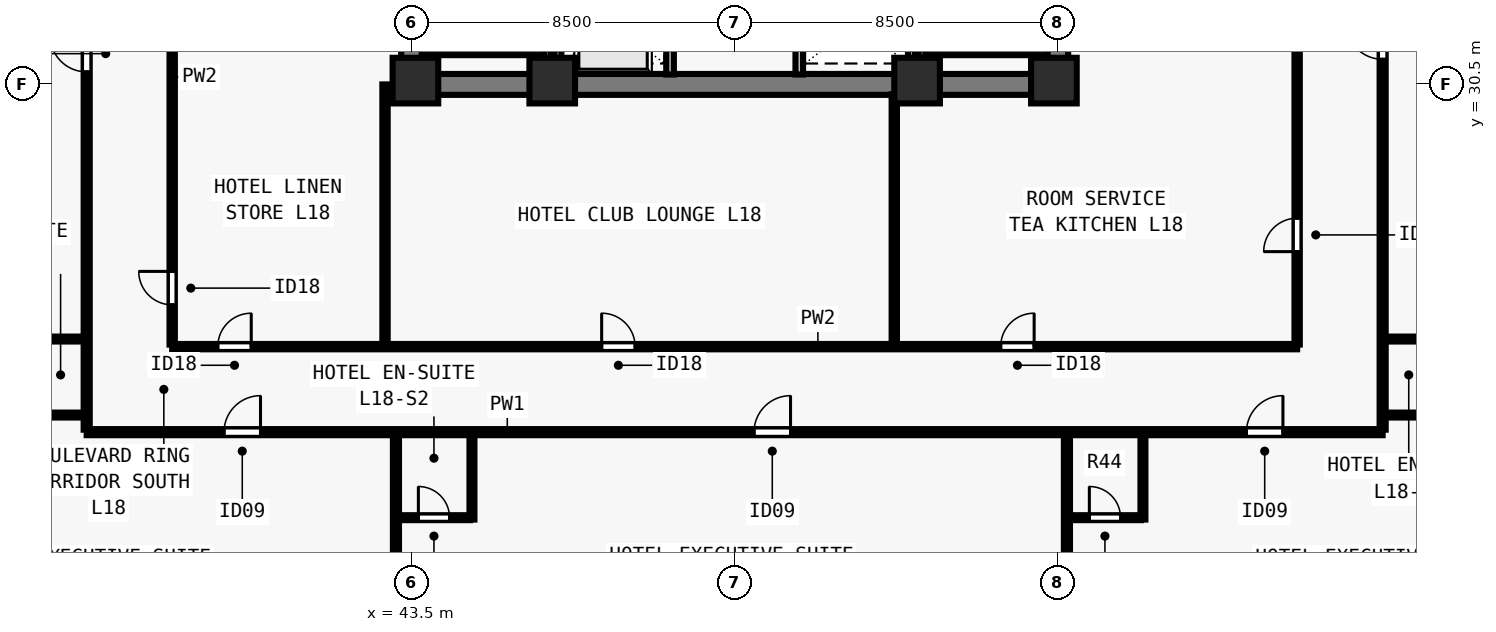
"""IFC4 building model, lengths in metres.
Left out: names, types, materials, properties, quantities, classifications, styles, units other than length and angle.
Written with IfcOpenShell. Run it as: python <this file> out.ifc"""

import sys

from ifc_helpers import new_model, si_unit, direction, frame, frame_2d, origin, origin_2d, place, context, subcontext, project, spatial, rectangle, extrude, element, fill, save


model = new_model("IFC4")
c1 = context("Model", 3, precision=1e-05, world=origin(), true_north=direction((0.0, 1.0)))
c2 = subcontext(c1, "Body", "Model", "MODEL_VIEW")
j1 = project(units=[si_unit("LENGTHUNIT", "METRE"), si_unit("PLANEANGLEUNIT", "RADIAN")], contexts=[c1])
p1 = place(None, origin())
s1 = spatial("IfcSite", under=j1, at=p1, CompositionType="ELEMENT")
p2 = place(p1, origin())
s2 = spatial("IfcBuilding", under=s1, at=p2, CompositionType="ELEMENT")
p3 = place(p2, frame((0.0, 0.0, 69.0)))
s3 = spatial("IfcBuildingStorey", under=s2, at=p3, CompositionType="ELEMENT", Elevation=69.0)
for number, where, z_axis, x_axis in (
    (1, (43.6, 30.6, 0.0), (0.0, 0.0, 1.0), (1.0, 0.0, 0.0)),
    (2, (47.2, 30.6, 0.0), (0.0, 0.0, 1.0), (1.0, 0.0, 0.0)),
    (3, (56.8, 30.6, 0.0), (0.0, 0.0, 1.0), (1.0, 0.0, 0.0)),
    (4, (60.4, 30.6, 0.0), (0.0, 0.0, 1.0), (1.0, 0.0, 0.0)),
):
    element("IfcColumn", number, at=place(p3, frame(where, z_axis=z_axis, x_axis=x_axis)), inside=s3, PredefinedType="COLUMN", context=c2, shape_type="SweptSolid", body=[
        extrude(rectangle(XDim=1.2, YDim=1.2, at=origin_2d()), origin(), (0.0, 0.0, 1.0), 3.5),
    ])
p4 = place(p3, frame((43.225, 30.5, 0.0), z_axis=(0.0, 0.0, 1.0), x_axis=(1.0, 0.0, 0.0)))
e5 = element("IfcWall", 5, at=p4, inside=s3, PredefinedType="SHEAR", context=c2, shape_type="SweptSolid", body=[
    extrude(rectangle(XDim=17.55, YDim=0.55, at=frame_2d((8.775, 0.0))), origin(), (0.0, 0.0, 1.0), 3.28),
])
for number, where, z_axis, x_axis in (
    (6, (43.5, 30.765, 0.0), (0.0, 0.0, 1.0), (0.0, 1.0, 0.0)),
    (7, (60.5, 30.765, 0.0), (0.0, 0.0, 1.0), (0.0, 1.0, 0.0)),
):
    element("IfcWall", number, at=place(p3, frame(where, z_axis=z_axis, x_axis=x_axis)), inside=s3, PredefinedType="SHEAR", context=c2, shape_type="SweptSolid", body=[
        extrude(rectangle(XDim=7.985, YDim=0.55, at=frame_2d((3.993, 0.0))), origin(), (0.0, 0.0, 1.0), 3.28),
    ])
p5 = place(p3, frame((50.3, 30.76, 0.0), z_axis=(0.0, 0.0, 1.0), x_axis=(0.0, 1.0, 0.0)))
e8 = element("IfcWall", 8, at=p5, inside=s3, PredefinedType="SOLIDWALL", context=c2, shape_type="SweptSolid", body=[
    extrude(rectangle(XDim=7.855, YDim=0.2, at=frame_2d((3.927, 0.0))), origin(), (0.0, 0.0, 1.0), 3.28),
])
p6 = place(p5, frame((0.79, 0.0, 0.0)))
e9 = element("IfcOpeningElement", 9, at=p6, cuts=e8, PredefinedType="OPENING", context=c2, shape_type="SweptSolid", body=[
    extrude(rectangle(XDim=1.1, YDim=2.2, at=frame_2d((0.55, 1.1))), frame((0.0, 0.11, 0.0), z_axis=(0.0, -1.0, 0.0), x_axis=(1.0, 0.0, 0.0)), (0.0, 0.0, 1.0), 0.22),
])
p7 = place(p5, frame((3.49, 0.0, 0.0)))
e10 = element("IfcOpeningElement", 10, at=p7, cuts=e8, PredefinedType="OPENING", context=c2, shape_type="SweptSolid", body=[
    extrude(rectangle(XDim=1.1, YDim=2.2, at=frame_2d((0.55, 1.1))), frame((0.0, 0.11, 0.0), z_axis=(0.0, -1.0, 0.0), x_axis=(1.0, 0.0, 0.0)), (0.0, 0.0, 1.0), 0.22),
])
p8 = place(p5, frame((6.19, 0.0, 0.0)))
e11 = element("IfcOpeningElement", 11, at=p8, cuts=e8, PredefinedType="OPENING", context=c2, shape_type="SweptSolid", body=[
    extrude(rectangle(XDim=1.1, YDim=2.2, at=frame_2d((0.55, 1.1))), frame((0.0, 0.11, 0.0), z_axis=(0.0, -1.0, 0.0), x_axis=(1.0, 0.0, 0.0)), (0.0, 0.0, 1.0), 0.22),
])
p9 = place(p3, frame((53.7, 30.76, 0.0), z_axis=(0.0, 0.0, 1.0), x_axis=(0.0, 1.0, 0.0)))
e12 = element("IfcWall", 12, at=p9, inside=s3, PredefinedType="SOLIDWALL", context=c2, shape_type="SweptSolid", body=[
    extrude(rectangle(XDim=7.855, YDim=0.2, at=frame_2d((3.927, 0.0))), origin(), (0.0, 0.0, 1.0), 3.28),
])
for number, where, z_axis, x_axis in (
    (13, (47.35, 30.76, 0.0), (0.0, 0.0, 1.0), (0.0, 1.0, 0.0)),
    (14, (56.65, 30.76, 0.0), (0.0, 0.0, 1.0), (0.0, 1.0, 0.0)),
):
    element("IfcWall", number, at=place(p3, frame(where, z_axis=z_axis, x_axis=x_axis)), inside=s3, PredefinedType="SOLIDWALL", context=c2, shape_type="SweptSolid", body=[
        extrude(rectangle(XDim=7.855, YDim=0.18, at=frame_2d((3.927, 0.0))), origin(), (0.0, 0.0, 1.0), 3.28),
    ])
p10 = place(p3, frame((34.95, 21.35, 0.0), z_axis=(0.0, 0.0, 1.0), x_axis=(1.0, 0.0, 0.0)))
e15 = element("IfcWall", 15, at=p10, inside=s3, PredefinedType="PARTITIONING", context=c2, shape_type="SweptSolid", body=[
    extrude(rectangle(XDim=34.1, YDim=0.16, at=frame_2d((17.05, 0.0))), origin(), (0.0, 0.0, 1.0), 3.28),
])
p11 = place(p10, frame((3.614, 0.0, 0.0)))
e16 = element("IfcOpeningElement", 16, at=p11, cuts=e15, PredefinedType="OPENING", context=c2, shape_type="SweptSolid", body=[
    extrude(rectangle(XDim=0.96, YDim=2.15, at=frame_2d((0.48, 1.075))), frame((0.0, 0.09, 0.0), z_axis=(0.0, -1.0, 0.0), x_axis=(1.0, 0.0, 0.0)), (0.0, 0.0, 1.0), 0.18),
])
p12 = place(p10, frame((17.56, 0.0, 0.0)))
e17 = element("IfcOpeningElement", 17, at=p12, cuts=e15, PredefinedType="OPENING", context=c2, shape_type="SweptSolid", body=[
    extrude(rectangle(XDim=0.96, YDim=2.15, at=frame_2d((0.48, 1.075))), frame((0.0, 0.09, 0.0), z_axis=(0.0, -1.0, 0.0), x_axis=(1.0, 0.0, 0.0)), (0.0, 0.0, 1.0), 0.18),
])
p13 = place(p10, frame((30.516, 0.0, 0.0)))
e18 = element("IfcOpeningElement", 18, at=p13, cuts=e15, PredefinedType="OPENING", context=c2, shape_type="SweptSolid", body=[
    extrude(rectangle(XDim=0.96, YDim=2.15, at=frame_2d((0.48, 1.075))), frame((0.0, 0.09, 0.0), z_axis=(0.0, -1.0, 0.0), x_axis=(1.0, 0.0, 0.0)), (0.0, 0.0, 1.0), 0.18),
])
p14 = place(p3, frame((34.95, 21.415, 0.0), z_axis=(0.0, 0.0, 1.0), x_axis=(0.0, 1.0, 0.0)))
e19 = element("IfcWall", 19, at=p14, inside=s3, PredefinedType="PARTITIONING", context=c2, shape_type="SweptSolid", body=[
    extrude(rectangle(XDim=35.17, YDim=0.16, at=frame_2d((17.585, 0.0))), origin(), (0.0, 0.0, 1.0), 3.28),
])
p15 = place(p14, frame((9.414, 0.0, 0.0)))
e20 = element("IfcOpeningElement", 20, at=p15, cuts=e19, PredefinedType="OPENING", context=c2, shape_type="SweptSolid", body=[
    extrude(rectangle(XDim=0.96, YDim=2.15, at=frame_2d((0.48, 1.075))), frame((0.0, 0.09, 0.0), z_axis=(0.0, -1.0, 0.0), x_axis=(1.0, 0.0, 0.0)), (0.0, 0.0, 1.0), 0.18),
])
p16 = place(p14, frame((26.814, 0.0, 0.0)))
e21 = element("IfcOpeningElement", 21, at=p16, cuts=e19, PredefinedType="OPENING", context=c2, shape_type="SweptSolid", body=[
    extrude(rectangle(XDim=0.96, YDim=2.15, at=frame_2d((0.48, 1.075))), frame((0.0, 0.09, 0.0), z_axis=(0.0, -1.0, 0.0), x_axis=(1.0, 0.0, 0.0)), (0.0, 0.0, 1.0), 0.18),
])
p17 = place(p3, frame((69.05, 21.415, 0.0), z_axis=(0.0, 0.0, 1.0), x_axis=(0.0, 1.0, 0.0)))
e22 = element("IfcWall", 22, at=p17, inside=s3, PredefinedType="PARTITIONING", context=c2, shape_type="SweptSolid", body=[
    extrude(rectangle(XDim=35.17, YDim=0.16, at=frame_2d((17.585, 0.0))), origin(), (0.0, 0.0, 1.0), 3.28),
])
p18 = place(p17, frame((9.746, 0.0, 0.0)))
e23 = element("IfcOpeningElement", 23, at=p18, cuts=e22, PredefinedType="OPENING", context=c2, shape_type="SweptSolid", body=[
    extrude(rectangle(XDim=0.96, YDim=2.15, at=frame_2d((0.48, 1.075))), frame((0.0, 0.09, 0.0), z_axis=(0.0, -1.0, 0.0), x_axis=(1.0, 0.0, 0.0)), (0.0, 0.0, 1.0), 0.18),
])
p19 = place(p17, frame((27.146, 0.0, 0.0)))
e24 = element("IfcOpeningElement", 24, at=p19, cuts=e22, PredefinedType="OPENING", context=c2, shape_type="SweptSolid", body=[
    extrude(rectangle(XDim=0.96, YDim=2.15, at=frame_2d((0.48, 1.075))), frame((0.0, 0.09, 0.0), z_axis=(0.0, -1.0, 0.0), x_axis=(1.0, 0.0, 0.0)), (0.0, 0.0, 1.0), 0.18),
])
p20 = place(p3, frame((37.2, 23.6, 0.0), z_axis=(0.0, 0.0, 1.0), x_axis=(1.0, 0.0, 0.0)))
e25 = element("IfcWall", 25, at=p20, inside=s3, PredefinedType="PARTITIONING", context=c2, shape_type="SweptSolid", body=[
    extrude(rectangle(XDim=29.6, YDim=0.14, at=frame_2d((14.8, 0.0))), origin(), (0.0, 0.0, 1.0), 3.28),
])
p21 = place(p20, frame((1.2, 0.0, 0.0)))
e26 = element("IfcOpeningElement", 26, at=p21, cuts=e25, PredefinedType="OPENING", context=c2, shape_type="SweptSolid", body=[
    extrude(rectangle(XDim=0.88, YDim=2.1, at=frame_2d((0.44, 1.05))), frame((0.0, 0.08, 0.0), z_axis=(0.0, -1.0, 0.0), x_axis=(1.0, 0.0, 0.0)), (0.0, 0.0, 1.0), 0.16),
])
p22 = place(p20, frame((11.3, 0.0, 0.0)))
e27 = element("IfcOpeningElement", 27, at=p22, cuts=e25, PredefinedType="OPENING", context=c2, shape_type="SweptSolid", body=[
    extrude(rectangle(XDim=0.88, YDim=2.1, at=frame_2d((0.44, 1.05))), frame((0.0, 0.08, 0.0), z_axis=(0.0, -1.0, 0.0), x_axis=(1.0, 0.0, 0.0)), (0.0, 0.0, 1.0), 0.16),
])
p23 = place(p20, frame((21.8, 0.0, 0.0)))
e28 = element("IfcOpeningElement", 28, at=p23, cuts=e25, PredefinedType="OPENING", context=c2, shape_type="SweptSolid", body=[
    extrude(rectangle(XDim=0.88, YDim=2.1, at=frame_2d((0.44, 1.05))), frame((0.0, 0.08, 0.0), z_axis=(0.0, -1.0, 0.0), x_axis=(1.0, 0.0, 0.0)), (0.0, 0.0, 1.0), 0.16),
])
p24 = place(p3, frame((37.2, 23.655, 0.0), z_axis=(0.0, 0.0, 1.0), x_axis=(0.0, 1.0, 0.0)))
e29 = element("IfcWall", 29, at=p24, inside=s3, PredefinedType="PARTITIONING", context=c2, shape_type="SweptSolid", body=[
    extrude(rectangle(XDim=15.095, YDim=0.14, at=frame_2d((7.547, 0.0))), origin(), (0.0, 0.0, 1.0), 3.28),
])
p25 = place(p24, frame((1.045, 0.0, 0.0)))
e30 = element("IfcOpeningElement", 30, at=p25, cuts=e29, PredefinedType="OPENING", context=c2, shape_type="SweptSolid", body=[
    extrude(rectangle(XDim=0.88, YDim=2.1, at=frame_2d((0.44, 1.05))), frame((0.0, 0.08, 0.0), z_axis=(0.0, -1.0, 0.0), x_axis=(1.0, 0.0, 0.0)), (0.0, 0.0, 1.0), 0.16),
])
p26 = place(p24, frame((12.145, 0.0, 0.0)))
e31 = element("IfcOpeningElement", 31, at=p26, cuts=e29, PredefinedType="OPENING", context=c2, shape_type="SweptSolid", body=[
    extrude(rectangle(XDim=0.88, YDim=2.1, at=frame_2d((0.44, 1.05))), frame((0.0, 0.08, 0.0), z_axis=(0.0, -1.0, 0.0), x_axis=(1.0, 0.0, 0.0)), (0.0, 0.0, 1.0), 0.16),
])
p27 = place(p3, frame((66.8, 23.655, 0.0), z_axis=(0.0, 0.0, 1.0), x_axis=(0.0, 1.0, 0.0)))
e32 = element("IfcWall", 32, at=p27, inside=s3, PredefinedType="PARTITIONING", context=c2, shape_type="SweptSolid", body=[
    extrude(rectangle(XDim=15.095, YDim=0.14, at=frame_2d((7.547, 0.0))), origin(), (0.0, 0.0, 1.0), 3.28),
])
p28 = place(p27, frame((2.445, 0.0, 0.0)))
e33 = element("IfcOpeningElement", 33, at=p28, cuts=e32, PredefinedType="OPENING", context=c2, shape_type="SweptSolid", body=[
    extrude(rectangle(XDim=0.88, YDim=2.1, at=frame_2d((0.44, 1.05))), frame((0.0, 0.08, 0.0), z_axis=(0.0, -1.0, 0.0), x_axis=(1.0, 0.0, 0.0)), (0.0, 0.0, 1.0), 0.16),
])
p29 = place(p3, frame((42.8, 23.655, 0.0), z_axis=(0.0, 0.0, 1.0), x_axis=(0.0, 1.0, 0.0)))
e34 = element("IfcWall", 34, at=p29, inside=s3, PredefinedType="PARTITIONING", context=c2, shape_type="SweptSolid", body=[
    extrude(rectangle(XDim=6.845, YDim=0.14, at=frame_2d((3.422, 0.0))), origin(), (0.0, 0.0, 1.0), 2.439),
])
p30 = place(p3, frame((56.2, 23.655, 0.0), z_axis=(0.0, 0.0, 1.0), x_axis=(0.0, 1.0, 0.0)))
e35 = element("IfcWall", 35, at=p30, inside=s3, PredefinedType="PARTITIONING", context=c2, shape_type="SweptSolid", body=[
    extrude(rectangle(XDim=6.585, YDim=0.14, at=frame_2d((3.292, 0.0))), origin(), (0.0, 0.0, 1.0), 2.849),
])
p31 = place(p3, frame((43.087, 13.845, 0.0), z_axis=(0.0, 0.0, 1.0), x_axis=(0.0, 1.0, 0.0)))
e36 = element("IfcWall", 36, at=p31, inside=s3, PredefinedType="PARTITIONING", context=c2, shape_type="SweptSolid", body=[
    extrude(rectangle(XDim=7.44, YDim=0.16, at=frame_2d((3.72, 0.0))), origin(), (0.0, 0.0, 1.0), 3.28),
])
p32 = place(p3, frame((45.087, 19.05, 0.0), z_axis=(0.0, 0.0, 1.0), x_axis=(0.0, 1.0, 0.0)))
e37 = element("IfcWall", 37, at=p32, inside=s3, PredefinedType="PLUMBINGWALL", context=c2, shape_type="SweptSolid", body=[
    extrude(rectangle(XDim=2.235, YDim=0.13, at=frame_2d((1.117, 0.0))), origin(), (0.0, 0.0, 1.0), 3.28),
])
p33 = place(p3, frame((43.153, 19.1, 0.0), z_axis=(0.0, 0.0, 1.0), x_axis=(1.0, 0.0, 0.0)))
e38 = element("IfcWall", 38, at=p33, inside=s3, PredefinedType="PLUMBINGWALL", context=c2, shape_type="SweptSolid", body=[
    extrude(rectangle(XDim=1.885, YDim=0.13, at=frame_2d((0.942, 0.0))), origin(), (0.0, 0.0, 1.0), 3.28),
])
p34 = place(p33, frame((0.525, 0.0, 0.0)))
e39 = element("IfcOpeningElement", 39, at=p34, cuts=e38, PredefinedType="OPENING", context=c2, shape_type="SweptSolid", body=[
    extrude(rectangle(XDim=0.82, YDim=2.1, at=frame_2d((0.41, 1.05))), frame((0.0, 0.075, 0.0), z_axis=(0.0, -1.0, 0.0), x_axis=(1.0, 0.0, 0.0)), (0.0, 0.0, 1.0), 0.15),
])
p35 = place(p3, frame((60.742, 13.845, 0.0), z_axis=(0.0, 0.0, 1.0), x_axis=(0.0, 1.0, 0.0)))
e40 = element("IfcWall", 40, at=p35, inside=s3, PredefinedType="PARTITIONING", context=c2, shape_type="SweptSolid", body=[
    extrude(rectangle(XDim=7.44, YDim=0.16, at=frame_2d((3.72, 0.0))), origin(), (0.0, 0.0, 1.0), 3.28),
])
p36 = place(p3, frame((62.742, 19.05, 0.0), z_axis=(0.0, 0.0, 1.0), x_axis=(0.0, 1.0, 0.0)))
e41 = element("IfcWall", 41, at=p36, inside=s3, PredefinedType="PLUMBINGWALL", context=c2, shape_type="SweptSolid", body=[
    extrude(rectangle(XDim=2.235, YDim=0.13, at=frame_2d((1.117, 0.0))), origin(), (0.0, 0.0, 1.0), 3.28),
])
p37 = place(p3, frame((60.808, 19.1, 0.0), z_axis=(0.0, 0.0, 1.0), x_axis=(1.0, 0.0, 0.0)))
e42 = element("IfcWall", 42, at=p37, inside=s3, PredefinedType="PLUMBINGWALL", context=c2, shape_type="SweptSolid", body=[
    extrude(rectangle(XDim=1.885, YDim=0.13, at=frame_2d((0.942, 0.0))), origin(), (0.0, 0.0, 1.0), 3.28),
])
p38 = place(p37, frame((0.525, 0.0, 0.0)))
e43 = element("IfcOpeningElement", 43, at=p38, cuts=e42, PredefinedType="OPENING", context=c2, shape_type="SweptSolid", body=[
    extrude(rectangle(XDim=0.82, YDim=2.1, at=frame_2d((0.41, 1.05))), frame((0.0, 0.075, 0.0), z_axis=(0.0, -1.0, 0.0), x_axis=(1.0, 0.0, 0.0)), (0.0, 0.0, 1.0), 0.15),
])
p39 = place(p3, frame((32.65, 21.8, 0.0), z_axis=(0.0, 0.0, 1.0), x_axis=(1.0, 0.0, 0.0)))
e44 = element("IfcWall", 44, at=p39, inside=s3, PredefinedType="PLUMBINGWALL", context=c2, shape_type="SweptSolid", body=[
    extrude(rectangle(XDim=2.235, YDim=0.13, at=frame_2d((1.118, 0.0))), origin(), (0.0, 0.0, 1.0), 2.849),
])
p40 = place(p3, frame((32.65, 23.8, 0.0), z_axis=(0.0, 0.0, 1.0), x_axis=(1.0, 0.0, 0.0)))
e45 = element("IfcWall", 45, at=p40, inside=s3, PredefinedType="PLUMBINGWALL", context=c2, shape_type="SweptSolid", body=[
    extrude(rectangle(XDim=2.235, YDim=0.13, at=frame_2d((1.118, 0.0))), origin(), (0.0, 0.0, 1.0), 3.28),
])
p41 = place(p3, frame((69.115, 21.8, 0.0), z_axis=(0.0, 0.0, 1.0), x_axis=(1.0, 0.0, 0.0)))
e46 = element("IfcWall", 46, at=p41, inside=s3, PredefinedType="PLUMBINGWALL", context=c2, shape_type="SweptSolid", body=[
    extrude(rectangle(XDim=2.235, YDim=0.13, at=frame_2d((1.118, 0.0))), origin(), (0.0, 0.0, 1.0), 2.849),
])
p42 = place(p3, frame((69.115, 23.8, 0.0), z_axis=(0.0, 0.0, 1.0), x_axis=(1.0, 0.0, 0.0)))
e47 = element("IfcWall", 47, at=p42, inside=s3, PredefinedType="PLUMBINGWALL", context=c2, shape_type="SweptSolid", body=[
    extrude(rectangle(XDim=2.235, YDim=0.13, at=frame_2d((1.118, 0.0))), origin(), (0.0, 0.0, 1.0), 3.28),
])
p43 = place(p3, frame((43.765, 31.36, 0.0), z_axis=(0.0, 0.0, 1.0), x_axis=(1.0, 0.0, 0.0)))
e48 = element("IfcWall", 48, at=p43, inside=s3, PredefinedType="SOLIDWALL", context=c2, shape_type="SweptSolid", body=[
    extrude(rectangle(XDim=3.23, YDim=0.18, at=frame_2d((1.615, 0.0))), origin(), (0.0, 0.0, 1.0), 3.28),
])
p44 = place(p3, frame((47.07, 38.78, 0.0), z_axis=(0.0, 0.0, 1.0), x_axis=(0.0, -1.0, 0.0)))
e49 = element("IfcWall", 49, at=p44, inside=s3, PredefinedType="SOLIDWALL", context=c2, shape_type="SweptSolid", body=[
    extrude(rectangle(XDim=8.017, YDim=0.18, at=frame_2d((4.009, 0.0))), origin(), (0.0, 0.0, 1.0), 3.28),
])
p45 = place(p3, frame((57.005, 31.36, 0.0), z_axis=(0.0, 0.0, 1.0), x_axis=(1.0, 0.0, 0.0)))
e50 = element("IfcWall", 50, at=p45, inside=s3, PredefinedType="SOLIDWALL", context=c2, shape_type="SweptSolid", body=[
    extrude(rectangle(XDim=3.23, YDim=0.18, at=frame_2d((1.615, 0.0))), origin(), (0.0, 0.0, 1.0), 3.28),
])
p46 = place(p3, frame((56.93, 38.78, 0.0), z_axis=(0.0, 0.0, 1.0), x_axis=(0.0, -1.0, 0.0)))
e51 = element("IfcWall", 51, at=p46, inside=s3, PredefinedType="SOLIDWALL", context=c2, shape_type="SweptSolid", body=[
    extrude(rectangle(XDim=8.017, YDim=0.18, at=frame_2d((4.009, 0.0))), origin(), (0.0, 0.0, 1.0), 3.28),
])
p47 = place(p21, origin())
e52 = element("IfcDoor", 52, at=p47, inside=s3, OperationType="SINGLE_SWING_RIGHT", PredefinedType="DOOR", context=c2, shape_type="SweptSolid", body=[
    extrude(rectangle(XDim=0.88, YDim=2.1, at=frame_2d((0.44, 1.05))), frame((0.0, 0.025, 0.0), z_axis=(0.0, -1.0, 0.0), x_axis=(1.0, 0.0, 0.0)), (0.0, 0.0, 1.0), 0.05),
])
fill(e26, e52)
p48 = place(p22, origin())
e53 = element("IfcDoor", 53, at=p48, inside=s3, OperationType="SINGLE_SWING_LEFT", PredefinedType="DOOR", context=c2, shape_type="SweptSolid", body=[
    extrude(rectangle(XDim=0.88, YDim=2.1, at=frame_2d((0.44, 1.05))), frame((0.0, 0.025, 0.0), z_axis=(0.0, -1.0, 0.0), x_axis=(1.0, 0.0, 0.0)), (0.0, 0.0, 1.0), 0.05),
])
fill(e27, e53)
p49 = place(p23, origin())
e54 = element("IfcDoor", 54, at=p49, inside=s3, OperationType="SINGLE_SWING_RIGHT", PredefinedType="DOOR", context=c2, shape_type="SweptSolid", body=[
    extrude(rectangle(XDim=0.88, YDim=2.1, at=frame_2d((0.44, 1.05))), frame((0.0, 0.025, 0.0), z_axis=(0.0, -1.0, 0.0), x_axis=(1.0, 0.0, 0.0)), (0.0, 0.0, 1.0), 0.05),
])
fill(e28, e54)
p50 = place(p25, origin())
e55 = element("IfcDoor", 55, at=p50, inside=s3, OperationType="SINGLE_SWING_RIGHT", PredefinedType="DOOR", context=c2, shape_type="SweptSolid", body=[
    extrude(rectangle(XDim=0.88, YDim=2.1, at=frame_2d((0.44, 1.05))), frame((0.0, 0.025, 0.0), z_axis=(0.0, -1.0, 0.0), x_axis=(1.0, 0.0, 0.0)), (0.0, 0.0, 1.0), 0.05),
])
fill(e30, e55)
p51 = place(p28, origin())
e56 = element("IfcDoor", 56, at=p51, inside=s3, OperationType="SINGLE_SWING_LEFT", PredefinedType="DOOR", context=c2, shape_type="SweptSolid", body=[
    extrude(rectangle(XDim=0.88, YDim=2.1, at=frame_2d((0.44, 1.05))), frame((0.0, 0.025, 0.0), z_axis=(0.0, -1.0, 0.0), x_axis=(1.0, 0.0, 0.0)), (0.0, 0.0, 1.0), 0.05),
])
fill(e33, e56)
p52 = place(p11, origin())
e57 = element("IfcDoor", 57, at=p52, inside=s3, OperationType="SINGLE_SWING_RIGHT", PredefinedType="DOOR", context=c2, shape_type="SweptSolid", body=[
    extrude(rectangle(XDim=0.96, YDim=2.15, at=frame_2d((0.48, 1.075))), frame((0.0, 0.025, 0.0), z_axis=(0.0, -1.0, 0.0), x_axis=(1.0, 0.0, 0.0)), (0.0, 0.0, 1.0), 0.05),
])
fill(e16, e57)
p53 = place(p34, origin())
e58 = element("IfcDoor", 58, at=p53, inside=s3, OperationType="SINGLE_SWING_LEFT", PredefinedType="DOOR", context=c2, shape_type="SweptSolid", body=[
    extrude(rectangle(XDim=0.82, YDim=2.1, at=frame_2d((0.41, 1.05))), frame((0.0, 0.025, 0.0), z_axis=(0.0, -1.0, 0.0), x_axis=(1.0, 0.0, 0.0)), (0.0, 0.0, 1.0), 0.05),
])
fill(e39, e58)
p54 = place(p12, origin())
e59 = element("IfcDoor", 59, at=p54, inside=s3, OperationType="SINGLE_SWING_RIGHT", PredefinedType="DOOR", context=c2, shape_type="SweptSolid", body=[
    extrude(rectangle(XDim=0.96, YDim=2.15, at=frame_2d((0.48, 1.075))), frame((0.0, 0.025, 0.0), z_axis=(0.0, -1.0, 0.0), x_axis=(1.0, 0.0, 0.0)), (0.0, 0.0, 1.0), 0.05),
])
fill(e17, e59)
p55 = place(p38, origin())
e60 = element("IfcDoor", 60, at=p55, inside=s3, OperationType="SINGLE_SWING_LEFT", PredefinedType="DOOR", context=c2, shape_type="SweptSolid", body=[
    extrude(rectangle(XDim=0.82, YDim=2.1, at=frame_2d((0.41, 1.05))), frame((0.0, 0.025, 0.0), z_axis=(0.0, -1.0, 0.0), x_axis=(1.0, 0.0, 0.0)), (0.0, 0.0, 1.0), 0.05),
])
fill(e43, e60)
p56 = place(p13, origin())
e61 = element("IfcDoor", 61, at=p56, inside=s3, OperationType="SINGLE_SWING_RIGHT", PredefinedType="DOOR", context=c2, shape_type="SweptSolid", body=[
    extrude(rectangle(XDim=0.96, YDim=2.15, at=frame_2d((0.48, 1.075))), frame((0.0, 0.025, 0.0), z_axis=(0.0, -1.0, 0.0), x_axis=(1.0, 0.0, 0.0)), (0.0, 0.0, 1.0), 0.05),
])
fill(e18, e61)
p57 = place(p15, origin())
e62 = element("IfcDoor", 62, at=p57, inside=s3, OperationType="SINGLE_SWING_RIGHT", PredefinedType="DOOR", context=c2, shape_type="SweptSolid", body=[
    extrude(rectangle(XDim=0.96, YDim=2.15, at=frame_2d((0.48, 1.075))), frame((0.0, 0.025, 0.0), z_axis=(0.0, -1.0, 0.0), x_axis=(1.0, 0.0, 0.0)), (0.0, 0.0, 1.0), 0.05),
])
fill(e20, e62)
p58 = place(p18, origin())
e63 = element("IfcDoor", 63, at=p58, inside=s3, OperationType="SINGLE_SWING_RIGHT", PredefinedType="DOOR", context=c2, shape_type="SweptSolid", body=[
    extrude(rectangle(XDim=0.96, YDim=2.15, at=frame_2d((0.48, 1.075))), frame((0.0, 0.025, 0.0), z_axis=(0.0, -1.0, 0.0), x_axis=(1.0, 0.0, 0.0)), (0.0, 0.0, 1.0), 0.05),
])
fill(e23, e63)
save(model, sys.argv[1])
